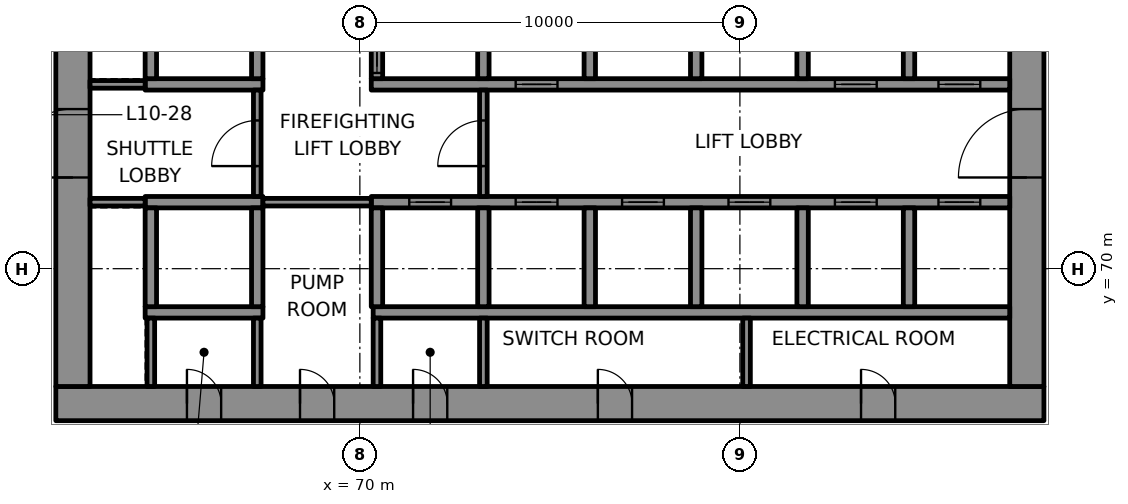
"""IFC4 building model, lengths in metres.
Left out: names, types, materials, properties, quantities, classifications, styles, units other than length and angle.
Written with IfcOpenShell. Run it as: python <this file> out.ifc"""

import sys

from ifc_helpers import new_model, si_unit, direction, frame, frame_2d, origin, place, context, subcontext, project, spatial, rectangle, extrude, element, fill, save


model = new_model("IFC4")
c1 = context("Model", 3, precision=1e-05, world=origin(), true_north=direction((0.0, 1.0)))
c2 = subcontext(c1, "Body", "Model", "MODEL_VIEW")
j1 = project(units=[si_unit("LENGTHUNIT", "METRE"), si_unit("PLANEANGLEUNIT", "RADIAN")], contexts=[c1])
p1 = place(None, origin())
s1 = spatial("IfcSite", under=j1, at=p1, CompositionType="ELEMENT")
p2 = place(p1, origin())
s2 = spatial("IfcBuilding", under=s1, at=p2, CompositionType="ELEMENT")
p3 = place(p2, frame((0.0, 0.0, 48.4)))
s3 = spatial("IfcBuildingStorey", under=s2, at=p3, CompositionType="ELEMENT", Elevation=48.4)
p4 = place(p3, frame((62.0, 66.45, 0.0), z_axis=(0.0, 0.0, 1.0), x_axis=(1.0, 0.0, 0.0)))
e1 = element("IfcWall", 1, at=p4, inside=s3, PredefinedType="SHEAR", context=c2, shape_type="SweptSolid", body=[
    extrude(rectangle(XDim=26.0, YDim=0.9, at=frame_2d((13.0, 0.0))), origin(), (0.0, 0.0, 1.0), 4.0),
])
p5 = place(p4, frame((3.45, 0.0, 0.0)))
e2 = element("IfcOpeningElement", 2, at=p5, cuts=e1, PredefinedType="OPENING", context=c2, shape_type="SweptSolid", body=[
    extrude(rectangle(XDim=0.9, YDim=2.1, at=frame_2d((0.45, 1.05))), frame((0.0, 0.46, 0.0), z_axis=(0.0, -1.0, 0.0), x_axis=(1.0, 0.0, 0.0)), (0.0, 0.0, 1.0), 0.92),
])
p6 = place(p4, frame((6.425, 0.0, 0.0)))
e3 = element("IfcOpeningElement", 3, at=p6, cuts=e1, PredefinedType="OPENING", context=c2, shape_type="SweptSolid", body=[
    extrude(rectangle(XDim=0.9, YDim=2.1, at=frame_2d((0.45, 1.05))), frame((0.0, 0.46, 0.0), z_axis=(0.0, -1.0, 0.0), x_axis=(1.0, 0.0, 0.0)), (0.0, 0.0, 1.0), 0.92),
])
p7 = place(p4, frame((9.4, 0.0, 0.0)))
e4 = element("IfcOpeningElement", 4, at=p7, cuts=e1, PredefinedType="OPENING", context=c2, shape_type="SweptSolid", body=[
    extrude(rectangle(XDim=0.9, YDim=2.1, at=frame_2d((0.45, 1.05))), frame((0.0, 0.46, 0.0), z_axis=(0.0, -1.0, 0.0), x_axis=(1.0, 0.0, 0.0)), (0.0, 0.0, 1.0), 0.92),
])
p8 = place(p4, frame((14.262, 0.0, 0.0)))
e5 = element("IfcOpeningElement", 5, at=p8, cuts=e1, PredefinedType="OPENING", context=c2, shape_type="SweptSolid", body=[
    extrude(rectangle(XDim=0.9, YDim=2.1, at=frame_2d((0.45, 1.05))), frame((0.0, 0.46, 0.0), z_axis=(0.0, -1.0, 0.0), x_axis=(1.0, 0.0, 0.0)), (0.0, 0.0, 1.0), 0.92),
])
p9 = place(p4, frame((21.188, 0.0, 0.0)))
e6 = element("IfcOpeningElement", 6, at=p9, cuts=e1, PredefinedType="OPENING", context=c2, shape_type="SweptSolid", body=[
    extrude(rectangle(XDim=0.9, YDim=2.1, at=frame_2d((0.45, 1.05))), frame((0.0, 0.46, 0.0), z_axis=(0.0, -1.0, 0.0), x_axis=(1.0, 0.0, 0.0)), (0.0, 0.0, 1.0), 0.92),
])
p10 = place(p3, frame((62.45, 66.9, 0.0), z_axis=(0.0, 0.0, 1.0), x_axis=(0.0, 1.0, 0.0)))
e7 = element("IfcWall", 7, at=p10, inside=s3, PredefinedType="SHEAR", context=c2, shape_type="SweptSolid", body=[
    extrude(rectangle(XDim=16.2, YDim=0.9, at=frame_2d((8.1, 0.0))), origin(), (0.0, 0.0, 1.0), 4.0),
])
p11 = place(p10, frame((5.5, 0.0, 0.0)))
e8 = element("IfcOpeningElement", 8, at=p11, cuts=e7, PredefinedType="OPENING", context=c2, shape_type="SweptSolid", body=[
    extrude(rectangle(XDim=1.8, YDim=2.1, at=frame_2d((0.9, 1.05))), frame((0.0, 0.46, 0.0), z_axis=(0.0, -1.0, 0.0), x_axis=(1.0, 0.0, 0.0)), (0.0, 0.0, 1.0), 0.92),
])
p12 = place(p3, frame((87.55, 66.9, 0.0), z_axis=(0.0, 0.0, 1.0), x_axis=(0.0, 1.0, 0.0)))
e9 = element("IfcWall", 9, at=p12, inside=s3, PredefinedType="SHEAR", context=c2, shape_type="SweptSolid", body=[
    extrude(rectangle(XDim=16.2, YDim=0.9, at=frame_2d((8.1, 0.0))), origin(), (0.0, 0.0, 1.0), 4.0),
])
p13 = place(p12, frame((5.5, 0.0, 0.0)))
e10 = element("IfcOpeningElement", 10, at=p13, cuts=e9, PredefinedType="OPENING", context=c2, shape_type="SweptSolid", body=[
    extrude(rectangle(XDim=1.8, YDim=2.1, at=frame_2d((0.9, 1.05))), frame((0.0, 0.46, 0.0), z_axis=(0.0, -1.0, 0.0), x_axis=(1.0, 0.0, 0.0)), (0.0, 0.0, 1.0), 0.92),
])
p14 = place(p12, frame((11.738, 0.0, 0.0)))
e11 = element("IfcOpeningElement", 11, at=p14, cuts=e9, PredefinedType="OPENING", context=c2, shape_type="SweptSolid", body=[
    extrude(rectangle(XDim=0.9, YDim=2.1, at=frame_2d((0.45, 1.05))), frame((0.0, 0.46, 0.0), z_axis=(0.0, -1.0, 0.0), x_axis=(1.0, 0.0, 0.0)), (0.0, 0.0, 1.0), 0.92),
])
p15 = place(p3, frame((64.35, 68.85, 0.0), z_axis=(0.0, 0.0, 1.0), x_axis=(1.0, 0.0, 0.0)))
e12 = element("IfcWall", 12, at=p15, inside=s3, PredefinedType="SHEAR", context=c2, shape_type="SweptSolid", body=[
    extrude(rectangle(XDim=3.1, YDim=0.3, at=frame_2d((1.55, 0.0))), origin(), (0.0, 0.0, 1.0), 4.0),
])
p16 = place(p3, frame((70.35, 68.85, 0.0), z_axis=(0.0, 0.0, 1.0), x_axis=(1.0, 0.0, 0.0)))
e13 = element("IfcWall", 13, at=p16, inside=s3, PredefinedType="SHEAR", context=c2, shape_type="SweptSolid", body=[
    extrude(rectangle(XDim=16.75, YDim=0.3, at=frame_2d((8.375, 0.0))), origin(), (0.0, 0.0, 1.0), 4.0),
])
p17 = place(p3, frame((64.35, 71.75, 0.0), z_axis=(0.0, 0.0, 1.0), x_axis=(1.0, 0.0, 0.0)))
e14 = element("IfcWall", 14, at=p17, inside=s3, PredefinedType="SHEAR", context=c2, shape_type="SweptSolid", body=[
    extrude(rectangle(XDim=3.1, YDim=0.3, at=frame_2d((1.55, 0.0))), origin(), (0.0, 0.0, 1.0), 4.0),
])
p18 = place(p3, frame((70.3, 71.75, 0.0), z_axis=(0.0, 0.0, 1.0), x_axis=(1.0, 0.0, 0.0)))
e15 = element("IfcWall", 15, at=p18, inside=s3, PredefinedType="SHEAR", context=c2, shape_type="SweptSolid", body=[
    extrude(rectangle(XDim=16.8, YDim=0.3, at=frame_2d((8.4, 0.0))), origin(), (0.0, 0.0, 1.0), 4.0),
])
p19 = place(p18, frame((1.0, 0.0, 0.0)))
e16 = element("IfcOpeningElement", 16, at=p19, cuts=e15, PredefinedType="OPENING", context=c2, shape_type="SweptSolid", body=[
    extrude(rectangle(XDim=1.1, YDim=2.1, at=frame_2d((0.55, 1.05))), frame((0.0, 0.16, 0.0), z_axis=(0.0, -1.0, 0.0), x_axis=(1.0, 0.0, 0.0)), (0.0, 0.0, 1.0), 0.32),
])
p20 = place(p18, frame((3.8, 0.0, 0.0)))
e17 = element("IfcOpeningElement", 17, at=p20, cuts=e15, PredefinedType="OPENING", context=c2, shape_type="SweptSolid", body=[
    extrude(rectangle(XDim=1.1, YDim=2.1, at=frame_2d((0.55, 1.05))), frame((0.0, 0.16, 0.0), z_axis=(0.0, -1.0, 0.0), x_axis=(1.0, 0.0, 0.0)), (0.0, 0.0, 1.0), 0.32),
])
p21 = place(p18, frame((6.6, 0.0, 0.0)))
e18 = element("IfcOpeningElement", 18, at=p21, cuts=e15, PredefinedType="OPENING", context=c2, shape_type="SweptSolid", body=[
    extrude(rectangle(XDim=1.1, YDim=2.1, at=frame_2d((0.55, 1.05))), frame((0.0, 0.16, 0.0), z_axis=(0.0, -1.0, 0.0), x_axis=(1.0, 0.0, 0.0)), (0.0, 0.0, 1.0), 0.32),
])
p22 = place(p18, frame((9.4, 0.0, 0.0)))
e19 = element("IfcOpeningElement", 19, at=p22, cuts=e15, PredefinedType="OPENING", context=c2, shape_type="SweptSolid", body=[
    extrude(rectangle(XDim=1.1, YDim=2.1, at=frame_2d((0.55, 1.05))), frame((0.0, 0.16, 0.0), z_axis=(0.0, -1.0, 0.0), x_axis=(1.0, 0.0, 0.0)), (0.0, 0.0, 1.0), 0.32),
])
p23 = place(p18, frame((12.2, 0.0, 0.0)))
e20 = element("IfcOpeningElement", 20, at=p23, cuts=e15, PredefinedType="OPENING", context=c2, shape_type="SweptSolid", body=[
    extrude(rectangle(XDim=1.1, YDim=2.1, at=frame_2d((0.55, 1.05))), frame((0.0, 0.16, 0.0), z_axis=(0.0, -1.0, 0.0), x_axis=(1.0, 0.0, 0.0)), (0.0, 0.0, 1.0), 0.32),
])
p24 = place(p18, frame((14.925, 0.0, 0.0)))
e21 = element("IfcOpeningElement", 21, at=p24, cuts=e15, PredefinedType="OPENING", context=c2, shape_type="SweptSolid", body=[
    extrude(rectangle(XDim=1.1, YDim=2.1, at=frame_2d((0.55, 1.05))), frame((0.0, 0.16, 0.0), z_axis=(0.0, -1.0, 0.0), x_axis=(1.0, 0.0, 0.0)), (0.0, 0.0, 1.0), 0.32),
])
p25 = place(p3, frame((64.35, 74.85, 0.0), z_axis=(0.0, 0.0, 1.0), x_axis=(1.0, 0.0, 0.0)))
e22 = element("IfcWall", 22, at=p25, inside=s3, PredefinedType="SHEAR", context=c2, shape_type="SweptSolid", body=[
    extrude(rectangle(XDim=3.1, YDim=0.3, at=frame_2d((1.55, 0.0))), origin(), (0.0, 0.0, 1.0), 4.0),
])
p26 = place(p3, frame((70.3, 74.85, 0.0), z_axis=(0.0, 0.0, 1.0), x_axis=(1.0, 0.0, 0.0)))
e23 = element("IfcWall", 23, at=p26, inside=s3, PredefinedType="SHEAR", context=c2, shape_type="SweptSolid", body=[
    extrude(rectangle(XDim=16.8, YDim=0.3, at=frame_2d((8.4, 0.0))), origin(), (0.0, 0.0, 1.0), 4.0),
])
p27 = place(p26, frame((3.8, 0.0, 0.0)))
e24 = element("IfcOpeningElement", 24, at=p27, cuts=e23, PredefinedType="OPENING", context=c2, shape_type="SweptSolid", body=[
    extrude(rectangle(XDim=1.1, YDim=2.1, at=frame_2d((0.55, 1.05))), frame((0.0, 0.16, 0.0), z_axis=(0.0, -1.0, 0.0), x_axis=(1.0, 0.0, 0.0)), (0.0, 0.0, 1.0), 0.32),
])
p28 = place(p26, frame((12.2, 0.0, 0.0)))
e25 = element("IfcOpeningElement", 25, at=p28, cuts=e23, PredefinedType="OPENING", context=c2, shape_type="SweptSolid", body=[
    extrude(rectangle(XDim=1.1, YDim=2.1, at=frame_2d((0.55, 1.05))), frame((0.0, 0.16, 0.0), z_axis=(0.0, -1.0, 0.0), x_axis=(1.0, 0.0, 0.0)), (0.0, 0.0, 1.0), 0.32),
])
p29 = place(p26, frame((14.925, 0.0, 0.0)))
e26 = element("IfcOpeningElement", 26, at=p29, cuts=e23, PredefinedType="OPENING", context=c2, shape_type="SweptSolid", body=[
    extrude(rectangle(XDim=1.1, YDim=2.1, at=frame_2d((0.55, 1.05))), frame((0.0, 0.16, 0.0), z_axis=(0.0, -1.0, 0.0), x_axis=(1.0, 0.0, 0.0)), (0.0, 0.0, 1.0), 0.32),
])
for number, where, z_axis, x_axis in (
    (27, (64.5, 69.0, 0.0), (0.0, 0.0, 1.0), (0.0, 1.0, 0.0)),
    (28, (64.5, 75.0, 0.0), (0.0, 0.0, 1.0), (0.0, 1.0, 0.0)),
    (29, (67.3, 69.0, 0.0), (0.0, 0.0, 1.0), (0.0, 1.0, 0.0)),
    (30, (67.3, 75.0, 0.0), (0.0, 0.0, 1.0), (0.0, 1.0, 0.0)),
    (31, (70.45, 69.0, 0.0), (0.0, 0.0, 1.0), (0.0, 1.0, 0.0)),
):
    element("IfcWall", number, at=place(p3, frame(where, z_axis=z_axis, x_axis=x_axis)), inside=s3, PredefinedType="SHEAR", context=c2, shape_type="SweptSolid", body=[
        extrude(rectangle(XDim=2.6, YDim=0.3, at=frame_2d((1.3, 0.0))), origin(), (0.0, 0.0, 1.0), 4.0),
    ])
p30 = place(p3, frame((70.45, 75.0, 0.0), z_axis=(0.0, 0.0, 1.0), x_axis=(0.0, 1.0, 0.0)))
e32 = element("IfcWall", 32, at=p30, inside=s3, PredefinedType="SHEAR", context=c2, shape_type="SweptSolid", body=[
    extrude(rectangle(XDim=2.6, YDim=0.3, at=frame_2d((1.3, 0.0))), origin(), (0.0, 0.0, 1.0), 4.0),
])
p31 = place(p30, frame((0.15, 0.0, 0.0)))
e33 = element("IfcOpeningElement", 33, at=p31, cuts=e32, PredefinedType="OPENING", context=c2, shape_type="SweptSolid", body=[
    extrude(rectangle(XDim=1.1, YDim=2.1, at=frame_2d((0.55, 1.05))), frame((0.0, 0.16, 0.0), z_axis=(0.0, -1.0, 0.0), x_axis=(1.0, 0.0, 0.0)), (0.0, 0.0, 1.0), 0.32),
])
for number, where, z_axis, x_axis in (
    (34, (73.25, 69.0, 0.0), (0.0, 0.0, 1.0), (0.0, 1.0, 0.0)),
    (35, (73.25, 75.0, 0.0), (0.0, 0.0, 1.0), (0.0, 1.0, 0.0)),
    (36, (76.05, 69.0, 0.0), (0.0, 0.0, 1.0), (0.0, 1.0, 0.0)),
    (37, (76.05, 75.0, 0.0), (0.0, 0.0, 1.0), (0.0, 1.0, 0.0)),
    (38, (78.85, 69.0, 0.0), (0.0, 0.0, 1.0), (0.0, 1.0, 0.0)),
    (39, (78.85, 75.0, 0.0), (0.0, 0.0, 1.0), (0.0, 1.0, 0.0)),
    (40, (81.65, 69.0, 0.0), (0.0, 0.0, 1.0), (0.0, 1.0, 0.0)),
    (41, (81.65, 75.0, 0.0), (0.0, 0.0, 1.0), (0.0, 1.0, 0.0)),
    (42, (84.45, 69.0, 0.0), (0.0, 0.0, 1.0), (0.0, 1.0, 0.0)),
    (43, (84.45, 75.0, 0.0), (0.0, 0.0, 1.0), (0.0, 1.0, 0.0)),
):
    element("IfcWall", number, at=place(p3, frame(where, z_axis=z_axis, x_axis=x_axis)), inside=s3, PredefinedType="SHEAR", context=c2, shape_type="SweptSolid", body=[
        extrude(rectangle(XDim=2.6, YDim=0.3, at=frame_2d((1.3, 0.0))), origin(), (0.0, 0.0, 1.0), 4.0),
    ])
p32 = place(p3, frame((62.9, 71.75, 0.0), z_axis=(0.0, 0.0, 1.0), x_axis=(1.0, 0.0, 0.0)))
e44 = element("IfcWall", 44, at=p32, inside=s3, PredefinedType="PARTITIONING", context=c2, shape_type="SweptSolid", body=[
    extrude(rectangle(XDim=1.45, YDim=0.2, at=frame_2d((0.725, 0.0))), origin(), (0.0, 0.0, 1.0), 4.0),
])
p33 = place(p3, frame((67.45, 71.75, 0.0), z_axis=(0.0, 0.0, 1.0), x_axis=(1.0, 0.0, 0.0)))
e45 = element("IfcWall", 45, at=p33, inside=s3, PredefinedType="PARTITIONING", context=c2, shape_type="SweptSolid", body=[
    extrude(rectangle(XDim=2.85, YDim=0.2, at=frame_2d((1.425, 0.0))), origin(), (0.0, 0.0, 1.0), 4.0),
])
p34 = place(p3, frame((62.9, 74.85, 0.0), z_axis=(0.0, 0.0, 1.0), x_axis=(1.0, 0.0, 0.0)))
e46 = element("IfcWall", 46, at=p34, inside=s3, PredefinedType="PARTITIONING", context=c2, shape_type="SweptSolid", body=[
    extrude(rectangle(XDim=1.45, YDim=0.2, at=frame_2d((0.725, 0.0))), origin(), (0.0, 0.0, 1.0), 4.0),
])
for number, where, z_axis, x_axis in (
    (47, (64.5, 66.9, 0.0), (0.0, 0.0, 1.0), (0.0, 1.0, 0.0)),
    (48, (67.3, 66.9, 0.0), (0.0, 0.0, 1.0), (0.0, 1.0, 0.0)),
):
    element("IfcWall", number, at=place(p3, frame(where, z_axis=z_axis, x_axis=x_axis)), inside=s3, PredefinedType="PARTITIONING", context=c2, shape_type="SweptSolid", body=[
        extrude(rectangle(XDim=1.8, YDim=0.2, at=frame_2d((0.9, 0.0))), origin(), (0.0, 0.0, 1.0), 4.0),
    ])
p35 = place(p3, frame((67.3, 71.9, 0.0), z_axis=(0.0, 0.0, 1.0), x_axis=(0.0, 1.0, 0.0)))
e49 = element("IfcWall", 49, at=p35, inside=s3, PredefinedType="PARTITIONING", context=c2, shape_type="SweptSolid", body=[
    extrude(rectangle(XDim=2.8, YDim=0.2, at=frame_2d((1.4, 0.0))), origin(), (0.0, 0.0, 1.0), 4.0),
])
p36 = place(p35, frame((0.8, 0.0, 0.0)))
e50 = element("IfcOpeningElement", 50, at=p36, cuts=e49, PredefinedType="OPENING", context=c2, shape_type="SweptSolid", body=[
    extrude(rectangle(XDim=1.2, YDim=2.1, at=frame_2d((0.6, 1.05))), frame((0.0, 0.11, 0.0), z_axis=(0.0, -1.0, 0.0), x_axis=(1.0, 0.0, 0.0)), (0.0, 0.0, 1.0), 0.22),
])
for number, where, z_axis, x_axis in (
    (51, (70.45, 66.9, 0.0), (0.0, 0.0, 1.0), (0.0, 1.0, 0.0)),
    (52, (73.25, 66.9, 0.0), (0.0, 0.0, 1.0), (0.0, 1.0, 0.0)),
):
    element("IfcWall", number, at=place(p3, frame(where, z_axis=z_axis, x_axis=x_axis)), inside=s3, PredefinedType="PARTITIONING", context=c2, shape_type="SweptSolid", body=[
        extrude(rectangle(XDim=1.8, YDim=0.2, at=frame_2d((0.9, 0.0))), origin(), (0.0, 0.0, 1.0), 4.0),
    ])
p37 = place(p3, frame((73.25, 71.9, 0.0), z_axis=(0.0, 0.0, 1.0), x_axis=(0.0, 1.0, 0.0)))
e53 = element("IfcWall", 53, at=p37, inside=s3, PredefinedType="PARTITIONING", context=c2, shape_type="SweptSolid", body=[
    extrude(rectangle(XDim=2.8, YDim=0.2, at=frame_2d((1.4, 0.0))), origin(), (0.0, 0.0, 1.0), 4.0),
])
p38 = place(p37, frame((0.8, 0.0, 0.0)))
e54 = element("IfcOpeningElement", 54, at=p38, cuts=e53, PredefinedType="OPENING", context=c2, shape_type="SweptSolid", body=[
    extrude(rectangle(XDim=1.2, YDim=2.1, at=frame_2d((0.6, 1.05))), frame((0.0, 0.11, 0.0), z_axis=(0.0, -1.0, 0.0), x_axis=(1.0, 0.0, 0.0)), (0.0, 0.0, 1.0), 0.22),
])
p39 = place(p3, frame((80.175, 66.9, 0.0), z_axis=(0.0, 0.0, 1.0), x_axis=(0.0, 1.0, 0.0)))
e55 = element("IfcWall", 55, at=p39, inside=s3, PredefinedType="PARTITIONING", context=c2, shape_type="SweptSolid", body=[
    extrude(rectangle(XDim=1.8, YDim=0.2, at=frame_2d((0.9, 0.0))), origin(), (0.0, 0.0, 1.0), 4.0),
])
p40 = place(p19, origin())
e56 = element("IfcDoor", 56, at=p40, inside=s3, OperationType="DOUBLE_DOOR_SLIDING", PredefinedType="DOOR", context=c2, shape_type="SweptSolid", body=[
    extrude(rectangle(XDim=1.1, YDim=2.1, at=frame_2d((0.55, 1.05))), frame((0.0, 0.025, 0.0), z_axis=(0.0, -1.0, 0.0), x_axis=(1.0, 0.0, 0.0)), (0.0, 0.0, 1.0), 0.05),
])
fill(e16, e56)
p41 = place(p20, origin())
e57 = element("IfcDoor", 57, at=p41, inside=s3, OperationType="DOUBLE_DOOR_SLIDING", PredefinedType="DOOR", context=c2, shape_type="SweptSolid", body=[
    extrude(rectangle(XDim=1.1, YDim=2.1, at=frame_2d((0.55, 1.05))), frame((0.0, 0.025, 0.0), z_axis=(0.0, -1.0, 0.0), x_axis=(1.0, 0.0, 0.0)), (0.0, 0.0, 1.0), 0.05),
])
fill(e17, e57)
p42 = place(p21, origin())
e58 = element("IfcDoor", 58, at=p42, inside=s3, OperationType="DOUBLE_DOOR_SLIDING", PredefinedType="DOOR", context=c2, shape_type="SweptSolid", body=[
    extrude(rectangle(XDim=1.1, YDim=2.1, at=frame_2d((0.55, 1.05))), frame((0.0, 0.025, 0.0), z_axis=(0.0, -1.0, 0.0), x_axis=(1.0, 0.0, 0.0)), (0.0, 0.0, 1.0), 0.05),
])
fill(e18, e58)
p43 = place(p22, origin())
e59 = element("IfcDoor", 59, at=p43, inside=s3, OperationType="DOUBLE_DOOR_SLIDING", PredefinedType="DOOR", context=c2, shape_type="SweptSolid", body=[
    extrude(rectangle(XDim=1.1, YDim=2.1, at=frame_2d((0.55, 1.05))), frame((0.0, 0.025, 0.0), z_axis=(0.0, -1.0, 0.0), x_axis=(1.0, 0.0, 0.0)), (0.0, 0.0, 1.0), 0.05),
])
fill(e19, e59)
p44 = place(p23, origin())
e60 = element("IfcDoor", 60, at=p44, inside=s3, OperationType="DOUBLE_DOOR_SLIDING", PredefinedType="DOOR", context=c2, shape_type="SweptSolid", body=[
    extrude(rectangle(XDim=1.1, YDim=2.1, at=frame_2d((0.55, 1.05))), frame((0.0, 0.025, 0.0), z_axis=(0.0, -1.0, 0.0), x_axis=(1.0, 0.0, 0.0)), (0.0, 0.0, 1.0), 0.05),
])
fill(e20, e60)
p45 = place(p24, origin())
e61 = element("IfcDoor", 61, at=p45, inside=s3, OperationType="DOUBLE_DOOR_SLIDING", PredefinedType="DOOR", context=c2, shape_type="SweptSolid", body=[
    extrude(rectangle(XDim=1.1, YDim=2.1, at=frame_2d((0.55, 1.05))), frame((0.0, 0.025, 0.0), z_axis=(0.0, -1.0, 0.0), x_axis=(1.0, 0.0, 0.0)), (0.0, 0.0, 1.0), 0.05),
])
fill(e21, e61)
p46 = place(p31, origin())
e62 = element("IfcDoor", 62, at=p46, inside=s3, OperationType="DOUBLE_DOOR_SLIDING", PredefinedType="DOOR", context=c2, shape_type="SweptSolid", body=[
    extrude(rectangle(XDim=1.1, YDim=2.1, at=frame_2d((0.55, 1.05))), frame((0.0, 0.025, 0.0), z_axis=(0.0, -1.0, 0.0), x_axis=(1.0, 0.0, 0.0)), (0.0, 0.0, 1.0), 0.05),
])
fill(e33, e62)
p47 = place(p27, origin())
e63 = element("IfcDoor", 63, at=p47, inside=s3, OperationType="DOUBLE_DOOR_SLIDING", PredefinedType="DOOR", context=c2, shape_type="SweptSolid", body=[
    extrude(rectangle(XDim=1.1, YDim=2.1, at=frame_2d((0.55, 1.05))), frame((0.0, 0.025, 0.0), z_axis=(0.0, -1.0, 0.0), x_axis=(1.0, 0.0, 0.0)), (0.0, 0.0, 1.0), 0.05),
])
fill(e24, e63)
p48 = place(p28, origin())
e64 = element("IfcDoor", 64, at=p48, inside=s3, OperationType="DOUBLE_DOOR_SLIDING", PredefinedType="DOOR", context=c2, shape_type="SweptSolid", body=[
    extrude(rectangle(XDim=1.1, YDim=2.1, at=frame_2d((0.55, 1.05))), frame((0.0, 0.025, 0.0), z_axis=(0.0, -1.0, 0.0), x_axis=(1.0, 0.0, 0.0)), (0.0, 0.0, 1.0), 0.05),
])
fill(e25, e64)
p49 = place(p29, origin())
e65 = element("IfcDoor", 65, at=p49, inside=s3, OperationType="DOUBLE_DOOR_SLIDING", PredefinedType="DOOR", context=c2, shape_type="SweptSolid", body=[
    extrude(rectangle(XDim=1.1, YDim=2.1, at=frame_2d((0.55, 1.05))), frame((0.0, 0.025, 0.0), z_axis=(0.0, -1.0, 0.0), x_axis=(1.0, 0.0, 0.0)), (0.0, 0.0, 1.0), 0.05),
])
fill(e26, e65)
p50 = place(p38, origin())
e66 = element("IfcDoor", 66, at=p50, inside=s3, OperationType="SINGLE_SWING_LEFT", PredefinedType="DOOR", context=c2, shape_type="SweptSolid", body=[
    extrude(rectangle(XDim=1.2, YDim=2.1, at=frame_2d((0.6, 1.05))), frame((0.0, 0.025, 0.0), z_axis=(0.0, -1.0, 0.0), x_axis=(1.0, 0.0, 0.0)), (0.0, 0.0, 1.0), 0.05),
])
fill(e54, e66)
p51 = place(p36, origin())
e67 = element("IfcDoor", 67, at=p51, inside=s3, OperationType="SINGLE_SWING_RIGHT", PredefinedType="DOOR", context=c2, shape_type="SweptSolid", body=[
    extrude(rectangle(XDim=1.2, YDim=2.1, at=frame_2d((0.6, 1.05))), frame((0.0, 0.025, 0.0), z_axis=(0.0, -1.0, 0.0), x_axis=(1.0, 0.0, 0.0)), (0.0, 0.0, 1.0), 0.05),
])
fill(e50, e67)
p52 = place(p11, origin())
e68 = element("IfcDoor", 68, at=p52, inside=s3, OperationType="SINGLE_SWING_LEFT", PredefinedType="DOOR", context=c2, shape_type="SweptSolid", body=[
    extrude(rectangle(XDim=1.8, YDim=2.1, at=frame_2d((0.9, 1.05))), frame((0.0, 0.17, 0.0), z_axis=(0.0, -1.0, 0.0), x_axis=(1.0, 0.0, 0.0)), (0.0, 0.0, 1.0), 0.34),
])
fill(e8, e68)
p53 = place(p13, origin())
e69 = element("IfcDoor", 69, at=p53, inside=s3, OperationType="SINGLE_SWING_RIGHT", PredefinedType="DOOR", context=c2, shape_type="SweptSolid", body=[
    extrude(rectangle(XDim=1.8, YDim=2.1, at=frame_2d((0.9, 1.05))), frame((0.0, 0.17, 0.0), z_axis=(0.0, -1.0, 0.0), x_axis=(1.0, 0.0, 0.0)), (0.0, 0.0, 1.0), 0.34),
])
fill(e10, e69)
p54 = place(p5, origin())
e70 = element("IfcDoor", 70, at=p54, inside=s3, OperationType="SINGLE_SWING_LEFT", PredefinedType="DOOR", context=c2, shape_type="SweptSolid", body=[
    extrude(rectangle(XDim=0.9, YDim=2.1, at=frame_2d((0.45, 1.05))), frame((0.0, 0.17, 0.0), z_axis=(0.0, -1.0, 0.0), x_axis=(1.0, 0.0, 0.0)), (0.0, 0.0, 1.0), 0.34),
])
fill(e2, e70)
p55 = place(p6, origin())
e71 = element("IfcDoor", 71, at=p55, inside=s3, OperationType="SINGLE_SWING_RIGHT", PredefinedType="DOOR", context=c2, shape_type="SweptSolid", body=[
    extrude(rectangle(XDim=0.9, YDim=2.1, at=frame_2d((0.45, 1.05))), frame((0.0, 0.17, 0.0), z_axis=(0.0, -1.0, 0.0), x_axis=(1.0, 0.0, 0.0)), (0.0, 0.0, 1.0), 0.34),
])
fill(e3, e71)
p56 = place(p7, origin())
e72 = element("IfcDoor", 72, at=p56, inside=s3, OperationType="SINGLE_SWING_LEFT", PredefinedType="DOOR", context=c2, shape_type="SweptSolid", body=[
    extrude(rectangle(XDim=0.9, YDim=2.1, at=frame_2d((0.45, 1.05))), frame((0.0, 0.17, 0.0), z_axis=(0.0, -1.0, 0.0), x_axis=(1.0, 0.0, 0.0)), (0.0, 0.0, 1.0), 0.34),
])
fill(e4, e72)
p57 = place(p8, origin())
e73 = element("IfcDoor", 73, at=p57, inside=s3, OperationType="SINGLE_SWING_RIGHT", PredefinedType="DOOR", context=c2, shape_type="SweptSolid", body=[
    extrude(rectangle(XDim=0.9, YDim=2.1, at=frame_2d((0.45, 1.05))), frame((0.0, 0.17, 0.0), z_axis=(0.0, -1.0, 0.0), x_axis=(1.0, 0.0, 0.0)), (0.0, 0.0, 1.0), 0.34),
])
fill(e5, e73)
p58 = place(p9, origin())
e74 = element("IfcDoor", 74, at=p58, inside=s3, OperationType="SINGLE_SWING_LEFT", PredefinedType="DOOR", context=c2, shape_type="SweptSolid", body=[
    extrude(rectangle(XDim=0.9, YDim=2.1, at=frame_2d((0.45, 1.05))), frame((0.0, 0.17, 0.0), z_axis=(0.0, -1.0, 0.0), x_axis=(1.0, 0.0, 0.0)), (0.0, 0.0, 1.0), 0.34),
])
fill(e6, e74)
save(model, sys.argv[1])
